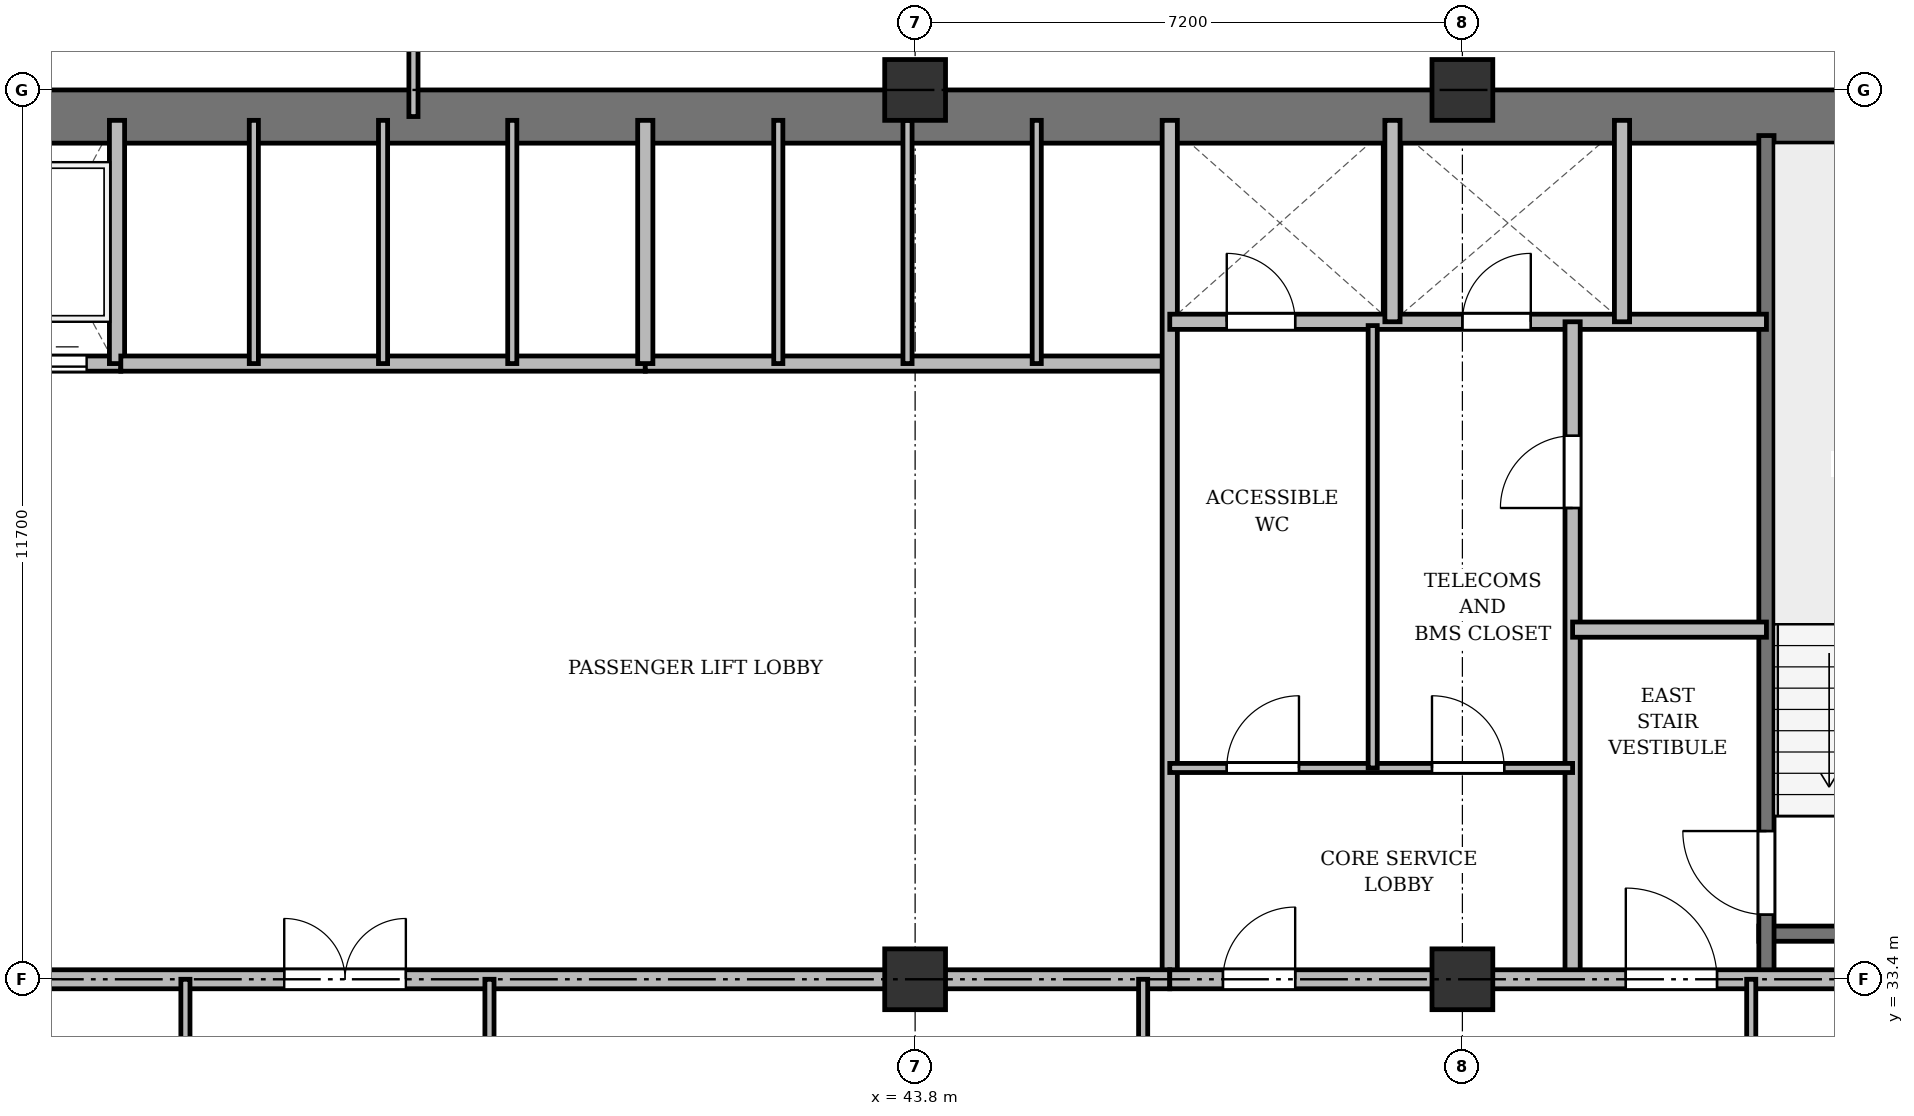
"""IFC4 building model, lengths in metres.
Left out: names, types, materials, properties, quantities, classifications, styles, units other than length and angle.
Written with IfcOpenShell. Run it as: python <this file> out.ifc"""

import sys

from ifc_helpers import new_model, si_unit, direction, frame, frame_2d, origin, origin_2d, place, context, subcontext, project, spatial, rectangle, extrude, source, transform, mapped, element, fill, save


model = new_model("IFC4")
c1 = context("Model", 3, precision=1e-05, world=origin(), true_north=direction((0.0, 1.0)))
c2 = subcontext(c1, "Body", "Model", "MODEL_VIEW")
j1 = project(units=[si_unit("LENGTHUNIT", "METRE"), si_unit("PLANEANGLEUNIT", "RADIAN")], contexts=[c1])
p1 = place(None, origin())
s1 = spatial("IfcSite", under=j1, at=p1, CompositionType="ELEMENT")
p2 = place(p1, origin())
s2 = spatial("IfcBuilding", under=s1, at=p2, CompositionType="ELEMENT")
p3 = place(p2, frame((0.0, 0.0, 110.5)))
s3 = spatial("IfcBuildingStorey", under=s2, at=p3, CompositionType="ELEMENT", Elevation=110.5)
m1 = source(origin(), c2, "Body", "SweptSolid", [
    extrude(rectangle(XDim=0.8, YDim=0.8, at=origin_2d()), origin(), (0.0, 0.0, 1.0), 3.6),
])
for number, where, z_axis, x_axis in (
    (1, (43.8, 33.4, 0.0), (0.0, 0.0, 1.0), (1.0, 0.0, 0.0)),
    (2, (43.8, 45.1, 0.0), (0.0, 0.0, 1.0), (1.0, 0.0, 0.0)),
    (3, (51.0, 33.4, 0.0), (0.0, 0.0, 1.0), (1.0, 0.0, 0.0)),
    (4, (51.0, 45.1, 0.0), (0.0, 0.0, 1.0), (1.0, 0.0, 0.0)),
):
    element("IfcColumn", number, at=place(p3, frame(where, z_axis=z_axis, x_axis=x_axis)), inside=s3, PredefinedType="COLUMN", context=c2, shape_type="MappedRepresentation", body=[
        mapped(m1, transform((0.0, 0.0, 0.0), x_axis=(1.0, 0.0, 0.0), y_axis=(0.0, 1.0, 0.0), z_axis=(0.0, 0.0, 1.0), scale=1.0)),
    ])
p4 = place(p3, frame((15.5, 44.75, 0.0), z_axis=(0.0, 0.0, 1.0), x_axis=(1.0, 0.0, 0.0)))
e5 = element("IfcWall", 5, at=p4, inside=s3, PredefinedType="SHEAR", context=c2, shape_type="SweptSolid", body=[
    extrude(rectangle(XDim=43.4, YDim=0.7, at=frame_2d((21.7, 0.0))), origin(), (0.0, 0.0, 1.0), 3.34),
])
p5 = place(p3, frame((54.9, 34.0, 0.0), z_axis=(0.0, 0.0, 1.0), x_axis=(1.0, 0.0, 0.0)))
e6 = element("IfcWall", 6, at=p5, inside=s3, PredefinedType="SHEAR", context=c2, shape_type="SweptSolid", body=[
    extrude(rectangle(XDim=3.4, YDim=0.2, at=frame_2d((1.7, 0.0))), origin(), (0.0, 0.0, 1.0), 3.34),
])
p6 = place(p3, frame((55.0, 33.4, 0.0), z_axis=(0.0, 0.0, 1.0), x_axis=(0.0, 1.0, 0.0)))
e7 = element("IfcWall", 7, at=p6, inside=s3, PredefinedType="SHEAR", context=c2, shape_type="SweptSolid", body=[
    extrude(rectangle(XDim=11.1, YDim=0.2, at=frame_2d((5.55, 0.0))), origin(), (0.0, 0.0, 1.0), 3.34),
])
p7 = place(p6, frame((0.85, 0.0, 0.0)))
e8 = element("IfcOpeningElement", 8, at=p7, cuts=e7, PredefinedType="OPENING", context=c2, shape_type="SweptSolid", body=[
    extrude(rectangle(XDim=1.1, YDim=2.15, at=frame_2d((0.55, 1.075))), frame((0.0, 0.11, 0.0), z_axis=(0.0, -1.0, 0.0), x_axis=(1.0, 0.0, 0.0)), (0.0, 0.0, 1.0), 0.22),
])
p8 = place(p3, frame((26.4, 41.5, 0.0), z_axis=(0.0, 0.0, 1.0), x_axis=(1.0, 0.0, 0.0)))
e9 = element("IfcWall", 9, at=p8, inside=s3, PredefinedType="SOLIDWALL", context=c2, shape_type="SweptSolid", body=[
    extrude(rectangle(XDim=6.95, YDim=0.2, at=frame_2d((3.475, 0.0))), origin(), (0.0, 0.0, 1.0), 3.34),
])
p9 = place(p8, frame((0.35, 0.0, 0.0)))
e10 = element("IfcOpeningElement", 10, at=p9, cuts=e9, PredefinedType="OPENING", context=c2, shape_type="SweptSolid", body=[
    extrude(rectangle(XDim=1.05, YDim=2.15, at=frame_2d((0.525, 1.075))), frame((0.0, 0.11, 0.0), z_axis=(0.0, -1.0, 0.0), x_axis=(1.0, 0.0, 0.0)), (0.0, 0.0, 1.0), 0.22),
])
p10 = place(p8, frame((2.05, 0.0, 0.0)))
e11 = element("IfcOpeningElement", 11, at=p10, cuts=e9, PredefinedType="OPENING", context=c2, shape_type="SweptSolid", body=[
    extrude(rectangle(XDim=1.05, YDim=2.15, at=frame_2d((0.525, 1.075))), frame((0.0, 0.11, 0.0), z_axis=(0.0, -1.0, 0.0), x_axis=(1.0, 0.0, 0.0)), (0.0, 0.0, 1.0), 0.22),
])
p11 = place(p8, frame((3.75, 0.0, 0.0)))
e12 = element("IfcOpeningElement", 12, at=p11, cuts=e9, PredefinedType="OPENING", context=c2, shape_type="SweptSolid", body=[
    extrude(rectangle(XDim=1.05, YDim=2.15, at=frame_2d((0.525, 1.075))), frame((0.0, 0.11, 0.0), z_axis=(0.0, -1.0, 0.0), x_axis=(1.0, 0.0, 0.0)), (0.0, 0.0, 1.0), 0.22),
])
p12 = place(p8, frame((5.45, 0.0, 0.0)))
e13 = element("IfcOpeningElement", 13, at=p12, cuts=e9, PredefinedType="OPENING", context=c2, shape_type="SweptSolid", body=[
    extrude(rectangle(XDim=1.05, YDim=2.15, at=frame_2d((0.525, 1.075))), frame((0.0, 0.11, 0.0), z_axis=(0.0, -1.0, 0.0), x_axis=(1.0, 0.0, 0.0)), (0.0, 0.0, 1.0), 0.22),
])
p13 = place(p3, frame((33.3, 41.5, 0.0), z_axis=(0.0, 0.0, 1.0), x_axis=(0.0, 1.0, 0.0)))
e14 = element("IfcWall", 14, at=p13, inside=s3, PredefinedType="SOLIDWALL", context=c2, shape_type="SweptSolid", body=[
    extrude(rectangle(XDim=3.2, YDim=0.2, at=frame_2d((1.6, 0.0))), origin(), (0.0, 0.0, 1.0), 3.34),
])
p14 = place(p3, frame((33.35, 41.5, 0.0), z_axis=(0.0, 0.0, 1.0), x_axis=(1.0, 0.0, 0.0)))
e15 = element("IfcWall", 15, at=p14, inside=s3, PredefinedType="SOLIDWALL", context=c2, shape_type="SweptSolid", body=[
    extrude(rectangle(XDim=6.9, YDim=0.2, at=frame_2d((3.45, 0.0))), origin(), (0.0, 0.0, 1.0), 3.34),
])
for number, where, z_axis, x_axis in (
    (16, (35.1, 41.5, 0.0), (0.0, 0.0, 1.0), (0.0, 1.0, 0.0)),
    (17, (36.8, 41.5, 0.0), (0.0, 0.0, 1.0), (0.0, 1.0, 0.0)),
    (18, (38.5, 41.5, 0.0), (0.0, 0.0, 1.0), (0.0, 1.0, 0.0)),
):
    element("IfcWall", number, at=place(p3, frame(where, z_axis=z_axis, x_axis=x_axis)), inside=s3, PredefinedType="PARTITIONING", context=c2, shape_type="SweptSolid", body=[
        extrude(rectangle(XDim=3.2, YDim=0.12, at=frame_2d((1.6, 0.0))), origin(), (0.0, 0.0, 1.0), 3.34),
    ])
p15 = place(p3, frame((40.25, 41.5, 0.0), z_axis=(0.0, 0.0, 1.0), x_axis=(1.0, 0.0, 0.0)))
e19 = element("IfcWall", 19, at=p15, inside=s3, PredefinedType="SOLIDWALL", context=c2, shape_type="SweptSolid", body=[
    extrude(rectangle(XDim=6.9, YDim=0.2, at=frame_2d((3.45, 0.0))), origin(), (0.0, 0.0, 1.0), 2.84),
])
p16 = place(p3, frame((40.25, 41.5, 0.0), z_axis=(0.0, 0.0, 1.0), x_axis=(0.0, 1.0, 0.0)))
e20 = element("IfcWall", 20, at=p16, inside=s3, PredefinedType="SOLIDWALL", context=c2, shape_type="SweptSolid", body=[
    extrude(rectangle(XDim=3.2, YDim=0.2, at=frame_2d((1.6, 0.0))), origin(), (0.0, 0.0, 1.0), 3.34),
])
p17 = place(p3, frame((42.0, 41.5, 0.0), z_axis=(0.0, 0.0, 1.0), x_axis=(0.0, 1.0, 0.0)))
e21 = element("IfcWall", 21, at=p17, inside=s3, PredefinedType="PARTITIONING", context=c2, shape_type="SweptSolid", body=[
    extrude(rectangle(XDim=3.2, YDim=0.12, at=frame_2d((1.6, 0.0))), origin(), (0.0, 0.0, 1.0), 3.34),
])
p18 = place(p3, frame((43.7, 41.5, 0.0), z_axis=(0.0, 0.0, 1.0), x_axis=(0.0, 1.0, 0.0)))
e22 = element("IfcWall", 22, at=p18, inside=s3, PredefinedType="PARTITIONING", context=c2, shape_type="SweptSolid", body=[
    extrude(rectangle(XDim=3.2, YDim=0.12, at=frame_2d((1.6, 0.0))), origin(), (0.0, 0.0, 1.0), 2.84),
])
p19 = place(p3, frame((45.4, 41.5, 0.0), z_axis=(0.0, 0.0, 1.0), x_axis=(0.0, 1.0, 0.0)))
e23 = element("IfcWall", 23, at=p19, inside=s3, PredefinedType="PARTITIONING", context=c2, shape_type="SweptSolid", body=[
    extrude(rectangle(XDim=3.2, YDim=0.12, at=frame_2d((1.6, 0.0))), origin(), (0.0, 0.0, 1.0), 3.34),
])
p20 = place(p3, frame((47.15, 33.4, 0.0), z_axis=(0.0, 0.0, 1.0), x_axis=(0.0, 1.0, 0.0)))
e24 = element("IfcWall", 24, at=p20, inside=s3, PredefinedType="SOLIDWALL", context=c2, shape_type="SweptSolid", body=[
    extrude(rectangle(XDim=11.3, YDim=0.2, at=frame_2d((5.65, 0.0))), origin(), (0.0, 0.0, 1.0), 2.752),
])
p21 = place(p3, frame((26.3, 33.4, 0.0), z_axis=(0.0, 0.0, 1.0), x_axis=(1.0, 0.0, 0.0)))
e25 = element("IfcWall", 25, at=p21, inside=s3, PredefinedType="PARTITIONING", context=c2, shape_type="SweptSolid", body=[
    extrude(rectangle(XDim=20.85, YDim=0.25, at=frame_2d((10.425, 0.0))), origin(), (0.0, 0.0, 1.0), 2.752),
])
p22 = place(p21, frame((9.2, 0.0, 0.0)))
e26 = element("IfcOpeningElement", 26, at=p22, cuts=e25, PredefinedType="OPENING", context=c2, shape_type="SweptSolid", body=[
    extrude(rectangle(XDim=1.6, YDim=2.2, at=frame_2d((0.8, 1.1))), frame((0.0, 0.135, 0.0), z_axis=(0.0, -1.0, 0.0), x_axis=(1.0, 0.0, 0.0)), (0.0, 0.0, 1.0), 0.27),
])
p23 = place(p3, frame((47.15, 42.05, 0.0), z_axis=(0.0, 0.0, 1.0), x_axis=(1.0, 0.0, 0.0)))
e27 = element("IfcWall", 27, at=p23, inside=s3, PredefinedType="SOLIDWALL", context=c2, shape_type="SweptSolid", body=[
    extrude(rectangle(XDim=7.85, YDim=0.2, at=frame_2d((3.925, 0.0))), origin(), (0.0, 0.0, 1.0), 2.84),
])
p24 = place(p23, frame((0.75, 0.0, 0.0)))
e28 = element("IfcOpeningElement", 28, at=p24, cuts=e27, PredefinedType="OPENING", context=c2, shape_type="SweptSolid", body=[
    extrude(rectangle(XDim=0.9, YDim=2.1, at=frame_2d((0.45, 1.05))), frame((0.0, 0.11, 0.0), z_axis=(0.0, -1.0, 0.0), x_axis=(1.0, 0.0, 0.0)), (0.0, 0.0, 1.0), 0.22),
])
p25 = place(p23, frame((3.85, 0.0, 0.0)))
e29 = element("IfcOpeningElement", 29, at=p25, cuts=e27, PredefinedType="OPENING", context=c2, shape_type="SweptSolid", body=[
    extrude(rectangle(XDim=0.9, YDim=2.1, at=frame_2d((0.45, 1.05))), frame((0.0, 0.11, 0.0), z_axis=(0.0, -1.0, 0.0), x_axis=(1.0, 0.0, 0.0)), (0.0, 0.0, 1.0), 0.22),
])
for number, where, z_axis, x_axis in (
    (30, (50.08, 42.05, 0.0), (0.0, 0.0, 1.0), (0.0, 1.0, 0.0)),
    (31, (53.1, 42.05, 0.0), (0.0, 0.0, 1.0), (0.0, 1.0, 0.0)),
):
    element("IfcWall", number, at=place(p3, frame(where, z_axis=z_axis, x_axis=x_axis)), inside=s3, PredefinedType="SOLIDWALL", context=c2, shape_type="SweptSolid", body=[
        extrude(rectangle(XDim=2.65, YDim=0.2, at=frame_2d((1.325, 0.0))), origin(), (0.0, 0.0, 1.0), 3.34),
    ])
p26 = place(p3, frame((52.45, 33.4, 0.0), z_axis=(0.0, 0.0, 1.0), x_axis=(0.0, 1.0, 0.0)))
e32 = element("IfcWall", 32, at=p26, inside=s3, PredefinedType="PARTITIONING", context=c2, shape_type="SweptSolid", body=[
    extrude(rectangle(XDim=8.65, YDim=0.2, at=frame_2d((4.325, 0.0))), origin(), (0.0, 0.0, 1.0), 2.752),
])
p27 = place(p26, frame((6.2, 0.0, 0.0)))
e33 = element("IfcOpeningElement", 33, at=p27, cuts=e32, PredefinedType="OPENING", context=c2, shape_type="SweptSolid", body=[
    extrude(rectangle(XDim=0.95, YDim=2.15, at=frame_2d((0.475, 1.075))), frame((0.0, 0.11, 0.0), z_axis=(0.0, -1.0, 0.0), x_axis=(1.0, 0.0, 0.0)), (0.0, 0.0, 1.0), 0.22),
])
p28 = place(p3, frame((52.45, 38.0, 0.0), z_axis=(0.0, 0.0, 1.0), x_axis=(1.0, 0.0, 0.0)))
e34 = element("IfcWall", 34, at=p28, inside=s3, PredefinedType="PARTITIONING", context=c2, shape_type="SweptSolid", body=[
    extrude(rectangle(XDim=2.55, YDim=0.2, at=frame_2d((1.275, 0.0))), origin(), (0.0, 0.0, 1.0), 3.34),
])
p29 = place(p3, frame((47.15, 36.18, 0.0), z_axis=(0.0, 0.0, 1.0), x_axis=(1.0, 0.0, 0.0)))
e35 = element("IfcWall", 35, at=p29, inside=s3, PredefinedType="PARTITIONING", context=c2, shape_type="SweptSolid", body=[
    extrude(rectangle(XDim=5.3, YDim=0.12, at=frame_2d((2.65, 0.0))), origin(), (0.0, 0.0, 1.0), 2.84),
])
p30 = place(p29, frame((0.75, 0.0, 0.0)))
e36 = element("IfcOpeningElement", 36, at=p30, cuts=e35, PredefinedType="OPENING", context=c2, shape_type="SweptSolid", body=[
    extrude(rectangle(XDim=0.95, YDim=2.15, at=frame_2d((0.475, 1.075))), frame((0.0, 0.07, 0.0), z_axis=(0.0, -1.0, 0.0), x_axis=(1.0, 0.0, 0.0)), (0.0, 0.0, 1.0), 0.14),
])
p31 = place(p29, frame((3.45, 0.0, 0.0)))
e37 = element("IfcOpeningElement", 37, at=p31, cuts=e35, PredefinedType="OPENING", context=c2, shape_type="SweptSolid", body=[
    extrude(rectangle(XDim=0.95, YDim=2.15, at=frame_2d((0.475, 1.075))), frame((0.0, 0.07, 0.0), z_axis=(0.0, -1.0, 0.0), x_axis=(1.0, 0.0, 0.0)), (0.0, 0.0, 1.0), 0.14),
])
p32 = place(p3, frame((49.82, 36.18, 0.0), z_axis=(0.0, 0.0, 1.0), x_axis=(0.0, 1.0, 0.0)))
e38 = element("IfcWall", 38, at=p32, inside=s3, PredefinedType="PARTITIONING", context=c2, shape_type="SweptSolid", body=[
    extrude(rectangle(XDim=5.82, YDim=0.12, at=frame_2d((2.91, 0.0))), origin(), (0.0, 0.0, 1.0), 3.34),
])
p33 = place(p3, frame((47.15, 33.4, 0.0), z_axis=(0.0, 0.0, 1.0), x_axis=(1.0, 0.0, 0.0)))
e39 = element("IfcWall", 39, at=p33, inside=s3, PredefinedType="PARTITIONING", context=c2, shape_type="SweptSolid", body=[
    extrude(rectangle(XDim=11.15, YDim=0.25, at=frame_2d((5.575, 0.0))), origin(), (0.0, 0.0, 1.0), 2.752),
])
p34 = place(p33, frame((0.7, 0.0, 0.0)))
e40 = element("IfcOpeningElement", 40, at=p34, cuts=e39, PredefinedType="OPENING", context=c2, shape_type="SweptSolid", body=[
    extrude(rectangle(XDim=0.95, YDim=2.15, at=frame_2d((0.475, 1.075))), frame((0.0, 0.135, 0.0), z_axis=(0.0, -1.0, 0.0), x_axis=(1.0, 0.0, 0.0)), (0.0, 0.0, 1.0), 0.27),
])
p35 = place(p33, frame((6.0, 0.0, 0.0)))
e41 = element("IfcOpeningElement", 41, at=p35, cuts=e39, PredefinedType="OPENING", context=c2, shape_type="SweptSolid", body=[
    extrude(rectangle(XDim=1.2, YDim=2.15, at=frame_2d((0.6, 1.075))), frame((0.0, 0.135, 0.0), z_axis=(0.0, -1.0, 0.0), x_axis=(1.0, 0.0, 0.0)), (0.0, 0.0, 1.0), 0.27),
])
for number, where, z_axis, x_axis in (
    (42, (34.2, 29.8, 0.0), (0.0, 0.0, 1.0), (0.0, 1.0, 0.0)),
    (43, (38.2, 29.8, 0.0), (0.0, 0.0, 1.0), (0.0, 1.0, 0.0)),
    (44, (46.8, 29.8, 0.0), (0.0, 0.0, 1.0), (0.0, 1.0, 0.0)),
    (45, (54.8, 29.8, 0.0), (0.0, 0.0, 1.0), (0.0, 1.0, 0.0)),
):
    element("IfcWall", number, at=place(p3, frame(where, z_axis=z_axis, x_axis=x_axis)), inside=s3, PredefinedType="PARTITIONING", context=c2, shape_type="SweptSolid", body=[
        extrude(rectangle(XDim=3.6, YDim=0.12, at=frame_2d((1.8, 0.0))), origin(), (0.0, 0.0, 1.0), 2.752),
    ])
p36 = place(p3, frame((37.2, 44.75, 0.0), z_axis=(0.0, 0.0, 1.0), x_axis=(0.0, 1.0, 0.0)))
e46 = element("IfcWall", 46, at=p36, inside=s3, PredefinedType="PARTITIONING", context=c2, shape_type="SweptSolid", body=[
    extrude(rectangle(XDim=3.61, YDim=0.12, at=frame_2d((1.805, 0.0))), origin(), (0.0, 0.0, 1.0), 2.752),
])
p37 = place(p36, frame((1.1, 0.0, 0.0)))
e47 = element("IfcOpeningElement", 47, at=p37, cuts=e46, PredefinedType="OPENING", context=c2, shape_type="SweptSolid", body=[
    extrude(rectangle(XDim=0.95, YDim=2.15, at=frame_2d((0.475, 1.075))), frame((0.0, 0.07, 0.0), z_axis=(0.0, -1.0, 0.0), x_axis=(1.0, 0.0, 0.0)), (0.0, 0.0, 1.0), 0.14),
])
m2 = source(origin(), c2, "Body", "SweptSolid", [
    extrude(rectangle(XDim=1.1, YDim=2.15, at=frame_2d((0.55, 1.075))), frame((0.0, 0.025, 0.0), z_axis=(0.0, -1.0, 0.0), x_axis=(1.0, 0.0, 0.0)), (0.0, 0.0, 1.0), 0.05),
])
p38 = place(p7, origin())
e48 = element("IfcDoor", 48, at=p38, inside=s3, OperationType="SINGLE_SWING_RIGHT", PredefinedType="DOOR", context=c2, shape_type="MappedRepresentation", body=[
    mapped(m2, transform((0.0, 0.0, 0.0), x_axis=(1.0, 0.0, 0.0), y_axis=(0.0, 1.0, 0.0), z_axis=(0.0, 0.0, 1.0), scale=1.0)),
])
fill(e8, e48)
m3 = source(origin(), c2, "Body", "SweptSolid", [
    extrude(rectangle(XDim=1.05, YDim=2.15, at=frame_2d((0.525, 1.075))), frame((0.0, 0.025, 0.0), z_axis=(0.0, -1.0, 0.0), x_axis=(1.0, 0.0, 0.0)), (0.0, 0.0, 1.0), 0.05),
])
p39 = place(p12, origin())
e49 = element("IfcDoor", 49, at=p39, inside=s3, OperationType="DOUBLE_DOOR_SLIDING", PredefinedType="DOOR", context=c2, shape_type="MappedRepresentation", body=[
    mapped(m3, transform((0.0, 0.0, 0.0), x_axis=(1.0, 0.0, 0.0), y_axis=(0.0, 1.0, 0.0), z_axis=(0.0, 0.0, 1.0), scale=1.0)),
])
fill(e13, e49)
m4 = source(origin(), c2, "Body", "SweptSolid", [
    extrude(rectangle(XDim=1.6, YDim=2.2, at=frame_2d((0.8, 1.1))), frame((0.0, 0.025, 0.0), z_axis=(0.0, -1.0, 0.0), x_axis=(1.0, 0.0, 0.0)), (0.0, 0.0, 1.0), 0.05),
])
p40 = place(p22, origin())
e50 = element("IfcDoor", 50, at=p40, inside=s3, OperationType="DOUBLE_DOOR_SINGLE_SWING", PredefinedType="DOOR", context=c2, shape_type="MappedRepresentation", body=[
    mapped(m4, transform((0.0, 0.0, 0.0), x_axis=(1.0, 0.0, 0.0), y_axis=(0.0, 1.0, 0.0), z_axis=(0.0, 0.0, 1.0), scale=1.0)),
])
fill(e26, e50)
m5 = source(origin(), c2, "Body", "SweptSolid", [
    extrude(rectangle(XDim=0.9, YDim=2.1, at=frame_2d((0.45, 1.05))), frame((0.0, 0.025, 0.0), z_axis=(0.0, -1.0, 0.0), x_axis=(1.0, 0.0, 0.0)), (0.0, 0.0, 1.0), 0.05),
])
p41 = place(p24, origin())
e51 = element("IfcDoor", 51, at=p41, inside=s3, OperationType="SINGLE_SWING_LEFT", PredefinedType="DOOR", context=c2, shape_type="MappedRepresentation", body=[
    mapped(m5, transform((0.0, 0.0, 0.0), x_axis=(1.0, 0.0, 0.0), y_axis=(0.0, 1.0, 0.0), z_axis=(0.0, 0.0, 1.0), scale=1.0)),
])
fill(e28, e51)
p42 = place(p25, origin())
e52 = element("IfcDoor", 52, at=p42, inside=s3, OperationType="SINGLE_SWING_RIGHT", PredefinedType="DOOR", context=c2, shape_type="MappedRepresentation", body=[
    mapped(m5, transform((0.0, 0.0, 0.0), x_axis=(1.0, 0.0, 0.0), y_axis=(0.0, 1.0, 0.0), z_axis=(0.0, 0.0, 1.0), scale=1.0)),
])
fill(e29, e52)
m6 = source(origin(), c2, "Body", "SweptSolid", [
    extrude(rectangle(XDim=0.95, YDim=2.15, at=frame_2d((0.475, 1.075))), frame((0.0, 0.025, 0.0), z_axis=(0.0, -1.0, 0.0), x_axis=(1.0, 0.0, 0.0)), (0.0, 0.0, 1.0), 0.05),
])
p43 = place(p27, origin())
e53 = element("IfcDoor", 53, at=p43, inside=s3, OperationType="SINGLE_SWING_LEFT", PredefinedType="DOOR", context=c2, shape_type="MappedRepresentation", body=[
    mapped(m6, transform((0.0, 0.0, 0.0), x_axis=(1.0, 0.0, 0.0), y_axis=(0.0, 1.0, 0.0), z_axis=(0.0, 0.0, 1.0), scale=1.0)),
])
fill(e33, e53)
p44 = place(p30, origin())
e54 = element("IfcDoor", 54, at=p44, inside=s3, OperationType="SINGLE_SWING_RIGHT", PredefinedType="DOOR", context=c2, shape_type="MappedRepresentation", body=[
    mapped(m6, transform((0.0, 0.0, 0.0), x_axis=(1.0, 0.0, 0.0), y_axis=(0.0, 1.0, 0.0), z_axis=(0.0, 0.0, 1.0), scale=1.0)),
])
fill(e36, e54)
p45 = place(p31, origin())
e55 = element("IfcDoor", 55, at=p45, inside=s3, OperationType="SINGLE_SWING_LEFT", PredefinedType="DOOR", context=c2, shape_type="MappedRepresentation", body=[
    mapped(m6, transform((0.0, 0.0, 0.0), x_axis=(1.0, 0.0, 0.0), y_axis=(0.0, 1.0, 0.0), z_axis=(0.0, 0.0, 1.0), scale=1.0)),
])
fill(e37, e55)
p46 = place(p34, origin())
e56 = element("IfcDoor", 56, at=p46, inside=s3, OperationType="SINGLE_SWING_RIGHT", PredefinedType="DOOR", context=c2, shape_type="MappedRepresentation", body=[
    mapped(m6, transform((0.0, 0.0, 0.0), x_axis=(1.0, 0.0, 0.0), y_axis=(0.0, 1.0, 0.0), z_axis=(0.0, 0.0, 1.0), scale=1.0)),
])
fill(e40, e56)
m7 = source(origin(), c2, "Body", "SweptSolid", [
    extrude(rectangle(XDim=1.2, YDim=2.15, at=frame_2d((0.6, 1.075))), frame((0.0, 0.025, 0.0), z_axis=(0.0, -1.0, 0.0), x_axis=(1.0, 0.0, 0.0)), (0.0, 0.0, 1.0), 0.05),
])
p47 = place(p35, origin())
e57 = element("IfcDoor", 57, at=p47, inside=s3, OperationType="SINGLE_SWING_LEFT", PredefinedType="DOOR", context=c2, shape_type="MappedRepresentation", body=[
    mapped(m7, transform((0.0, 0.0, 0.0), x_axis=(1.0, 0.0, 0.0), y_axis=(0.0, 1.0, 0.0), z_axis=(0.0, 0.0, 1.0), scale=1.0)),
])
fill(e41, e57)
save(model, sys.argv[1])
